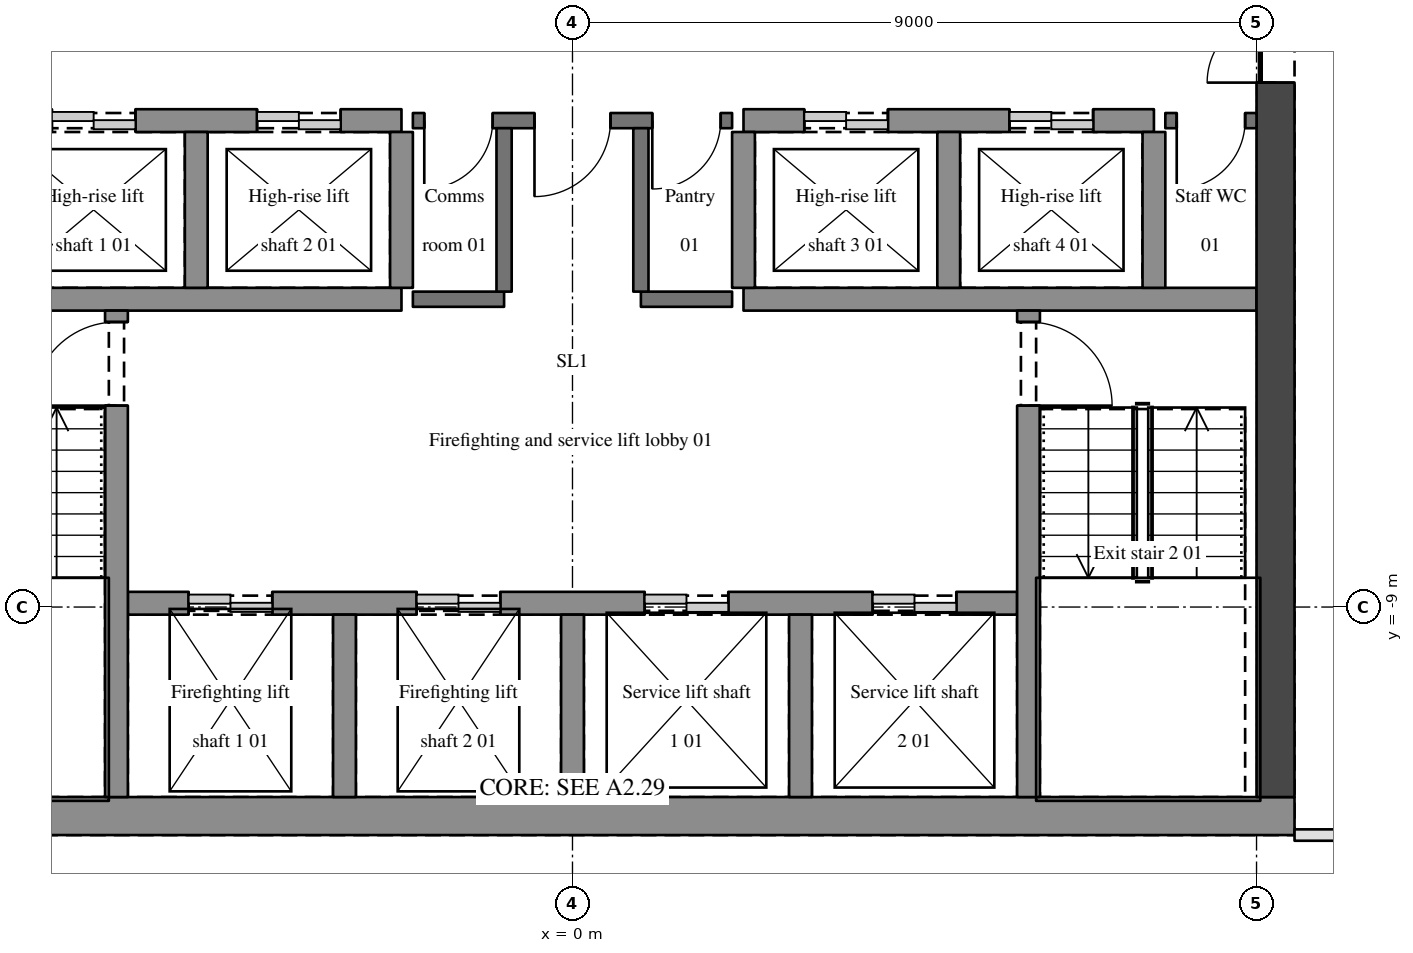
"""IFC4 building model, lengths in metres.
Left out: names, types, materials, properties, quantities, classifications, styles, units other than length and angle.
Written with IfcOpenShell. Run it as: python <this file> out.ifc"""

import sys

from ifc_helpers import new_model, si_unit, direction, frame, frame_2d, origin, place, context, subcontext, project, spatial, rectangle, extrude, element, fill, save


model = new_model("IFC4")
c1 = context("Model", 3, precision=1e-05, world=origin(), true_north=direction((0.0, 1.0)))
c2 = subcontext(c1, "Body", "Model", "MODEL_VIEW")
j1 = project(units=[si_unit("LENGTHUNIT", "METRE"), si_unit("PLANEANGLEUNIT", "RADIAN")], contexts=[c1])
p1 = place(None, origin())
s1 = spatial("IfcSite", under=j1, at=p1, CompositionType="ELEMENT")
p2 = place(p1, origin())
s2 = spatial("IfcBuilding", under=s1, at=p2, CompositionType="ELEMENT")
p3 = place(p2, frame((0.0, 0.0, 206.85)))
s3 = spatial("IfcBuildingStorey", under=s2, at=p3, CompositionType="ELEMENT", Elevation=206.85)
p4 = place(p3, frame((-9.5, -11.75, 0.0), z_axis=(0.0, 0.0, 1.0), x_axis=(1.0, 0.0, 0.0)))
e1 = element("IfcWall", 1, at=p4, inside=s3, PredefinedType="SHEAR", context=c2, shape_type="SweptSolid", body=[
    extrude(rectangle(XDim=19.0, YDim=0.5, at=frame_2d((9.5, 0.0))), origin(), (0.0, 0.0, 1.0), 3.15),
])
p5 = place(p3, frame((9.25, -11.5, 0.0), z_axis=(0.0, 0.0, 1.0), x_axis=(0.0, 1.0, 0.0)))
e2 = element("IfcWall", 2, at=p5, inside=s3, PredefinedType="SHEAR", context=c2, shape_type="SweptSolid", body=[
    extrude(rectangle(XDim=11.65, YDim=0.5, at=frame_2d((5.825, 0.0))), origin(), (0.0, 0.0, 1.0), 3.15),
])
p6 = place(p5, frame((9.4, 0.0, 0.0)))
e3 = element("IfcOpeningElement", 3, at=p6, cuts=e2, PredefinedType="OPENING", context=c2, shape_type="SweptSolid", body=[
    extrude(rectangle(XDim=1.8, YDim=2.1, at=frame_2d((0.9, 1.05))), frame((0.0, 0.26, 0.0), z_axis=(0.0, -1.0, 0.0), x_axis=(1.0, 0.0, 0.0)), (0.0, 0.0, 1.0), 0.52),
])
p7 = place(p3, frame((9.5, -12.0, 0.0), z_axis=(0.0, 0.0, 1.0), x_axis=(1.0, 0.0, 0.0)))
e4 = element("IfcWall", 4, at=p7, inside=s3, PredefinedType="PARTITIONING", context=c2, shape_type="SweptSolid", body=[
    extrude(rectangle(XDim=1.8, YDim=0.15, at=frame_2d((0.9, 0.0))), origin(), (0.0, 0.0, 1.0), 2.21),
])
p8 = place(p3, frame((-5.85, -8.95, 0.0), z_axis=(0.0, 0.0, 1.0), x_axis=(1.0, 0.0, 0.0)))
e5 = element("IfcWall", 5, at=p8, inside=s3, PredefinedType="SHEAR", context=c2, shape_type="SweptSolid", body=[
    extrude(rectangle(XDim=11.7, YDim=0.3, at=frame_2d((5.85, 0.0))), origin(), (0.0, 0.0, 1.0), 3.15),
])
p9 = place(p8, frame((0.8, 0.0, 0.0)))
e6 = element("IfcOpeningElement", 6, at=p9, cuts=e5, PredefinedType="OPENING", context=c2, shape_type="SweptSolid", body=[
    extrude(rectangle(XDim=1.1, YDim=2.1, at=frame_2d((0.55, 1.05))), frame((0.0, 0.16, 0.0), z_axis=(0.0, -1.0, 0.0), x_axis=(1.0, 0.0, 0.0)), (0.0, 0.0, 1.0), 0.32),
])
p10 = place(p8, frame((3.8, 0.0, 0.0)))
e7 = element("IfcOpeningElement", 7, at=p10, cuts=e5, PredefinedType="OPENING", context=c2, shape_type="SweptSolid", body=[
    extrude(rectangle(XDim=1.1, YDim=2.1, at=frame_2d((0.55, 1.05))), frame((0.0, 0.16, 0.0), z_axis=(0.0, -1.0, 0.0), x_axis=(1.0, 0.0, 0.0)), (0.0, 0.0, 1.0), 0.32),
])
p11 = place(p8, frame((6.8, 0.0, 0.0)))
e8 = element("IfcOpeningElement", 8, at=p11, cuts=e5, PredefinedType="OPENING", context=c2, shape_type="SweptSolid", body=[
    extrude(rectangle(XDim=1.1, YDim=2.1, at=frame_2d((0.55, 1.05))), frame((0.0, 0.16, 0.0), z_axis=(0.0, -1.0, 0.0), x_axis=(1.0, 0.0, 0.0)), (0.0, 0.0, 1.0), 0.32),
])
p12 = place(p8, frame((9.8, 0.0, 0.0)))
e9 = element("IfcOpeningElement", 9, at=p12, cuts=e5, PredefinedType="OPENING", context=c2, shape_type="SweptSolid", body=[
    extrude(rectangle(XDim=1.1, YDim=2.1, at=frame_2d((0.55, 1.05))), frame((0.0, 0.16, 0.0), z_axis=(0.0, -1.0, 0.0), x_axis=(1.0, 0.0, 0.0)), (0.0, 0.0, 1.0), 0.32),
])
p13 = place(p3, frame((-9.0, -4.95, 0.0), z_axis=(0.0, 0.0, 1.0), x_axis=(1.0, 0.0, 0.0)))
e10 = element("IfcWall", 10, at=p13, inside=s3, PredefinedType="SHEAR", context=c2, shape_type="SweptSolid", body=[
    extrude(rectangle(XDim=6.75, YDim=0.3, at=frame_2d((3.375, 0.0))), origin(), (0.0, 0.0, 1.0), 3.15),
])
for number, where, z_axis, x_axis in (
    (11, (-2.1, -4.95, 0.0), (0.0, 0.0, 1.0), (1.0, 0.0, 0.0)),
    (12, (0.9, -4.95, 0.0), (0.0, 0.0, 1.0), (1.0, 0.0, 0.0)),
):
    element("IfcWall", number, at=place(p3, frame(where, z_axis=z_axis, x_axis=x_axis)), inside=s3, PredefinedType="SOLIDWALL", context=c2, shape_type="SweptSolid", body=[
        extrude(rectangle(XDim=1.2, YDim=0.2, at=frame_2d((0.6, 0.0))), origin(), (0.0, 0.0, 1.0), 2.85),
    ])
p14 = place(p3, frame((2.25, -4.95, 0.0), z_axis=(0.0, 0.0, 1.0), x_axis=(1.0, 0.0, 0.0)))
e13 = element("IfcWall", 13, at=p14, inside=s3, PredefinedType="SHEAR", context=c2, shape_type="SweptSolid", body=[
    extrude(rectangle(XDim=6.75, YDim=0.3, at=frame_2d((3.375, 0.0))), origin(), (0.0, 0.0, 1.0), 3.15),
])
p15 = place(p3, frame((-7.65, -2.6, 0.0), z_axis=(0.0, 0.0, 1.0), x_axis=(1.0, 0.0, 0.0)))
e14 = element("IfcWall", 14, at=p15, inside=s3, PredefinedType="SHEAR", context=c2, shape_type="SweptSolid", body=[
    extrude(rectangle(XDim=5.4, YDim=0.3, at=frame_2d((2.7, 0.0))), origin(), (0.0, 0.0, 1.0), 3.15),
])
p16 = place(p15, frame((0.8, 0.0, 0.0)))
e15 = element("IfcOpeningElement", 15, at=p16, cuts=e14, PredefinedType="OPENING", context=c2, shape_type="SweptSolid", body=[
    extrude(rectangle(XDim=1.1, YDim=2.1, at=frame_2d((0.55, 1.05))), frame((0.0, 0.16, 0.0), z_axis=(0.0, -1.0, 0.0), x_axis=(1.0, 0.0, 0.0)), (0.0, 0.0, 1.0), 0.32),
])
p17 = place(p15, frame((3.5, 0.0, 0.0)))
e16 = element("IfcOpeningElement", 16, at=p17, cuts=e14, PredefinedType="OPENING", context=c2, shape_type="SweptSolid", body=[
    extrude(rectangle(XDim=1.1, YDim=2.1, at=frame_2d((0.55, 1.05))), frame((0.0, 0.16, 0.0), z_axis=(0.0, -1.0, 0.0), x_axis=(1.0, 0.0, 0.0)), (0.0, 0.0, 1.0), 0.32),
])
p18 = place(p3, frame((2.1, -2.6, 0.0), z_axis=(0.0, 0.0, 1.0), x_axis=(-1.0, 0.0, 0.0)))
e17 = element("IfcWall", 17, at=p18, inside=s3, PredefinedType="SOLIDWALL", context=c2, shape_type="SweptSolid", body=[
    extrude(rectangle(XDim=4.2, YDim=0.2, at=frame_2d((2.1, 0.0))), origin(), (0.0, 0.0, 1.0), 2.85),
])
p19 = place(p18, frame((1.6, 0.0, 0.0)))
e18 = element("IfcOpeningElement", 18, at=p19, cuts=e17, PredefinedType="OPENING", context=c2, shape_type="SweptSolid", body=[
    extrude(rectangle(XDim=1.0, YDim=2.1, at=frame_2d((0.5, 1.05))), frame((0.0, 0.11, 0.0), z_axis=(0.0, -1.0, 0.0), x_axis=(1.0, 0.0, 0.0)), (0.0, 0.0, 1.0), 0.22),
])
p20 = place(p18, frame((3.15, 0.0, 0.0)))
e19 = element("IfcOpeningElement", 19, at=p20, cuts=e17, PredefinedType="OPENING", context=c2, shape_type="SweptSolid", body=[
    extrude(rectangle(XDim=0.9, YDim=2.1, at=frame_2d((0.45, 1.05))), frame((0.0, 0.11, 0.0), z_axis=(0.0, -1.0, 0.0), x_axis=(1.0, 0.0, 0.0)), (0.0, 0.0, 1.0), 0.22),
])
p21 = place(p18, frame((0.15, 0.0, 0.0)))
e20 = element("IfcOpeningElement", 20, at=p21, cuts=e17, PredefinedType="OPENING", context=c2, shape_type="SweptSolid", body=[
    extrude(rectangle(XDim=0.9, YDim=2.1, at=frame_2d((0.45, 1.05))), frame((0.0, 0.11, 0.0), z_axis=(0.0, -1.0, 0.0), x_axis=(1.0, 0.0, 0.0)), (0.0, 0.0, 1.0), 0.22),
])
p22 = place(p3, frame((2.25, -2.6, 0.0), z_axis=(0.0, 0.0, 1.0), x_axis=(1.0, 0.0, 0.0)))
e21 = element("IfcWall", 21, at=p22, inside=s3, PredefinedType="SHEAR", context=c2, shape_type="SweptSolid", body=[
    extrude(rectangle(XDim=5.4, YDim=0.3, at=frame_2d((2.7, 0.0))), origin(), (0.0, 0.0, 1.0), 3.15),
])
p23 = place(p22, frame((0.8, 0.0, 0.0)))
e22 = element("IfcOpeningElement", 22, at=p23, cuts=e21, PredefinedType="OPENING", context=c2, shape_type="SweptSolid", body=[
    extrude(rectangle(XDim=1.1, YDim=2.1, at=frame_2d((0.55, 1.05))), frame((0.0, 0.16, 0.0), z_axis=(0.0, -1.0, 0.0), x_axis=(1.0, 0.0, 0.0)), (0.0, 0.0, 1.0), 0.32),
])
p24 = place(p22, frame((3.5, 0.0, 0.0)))
e23 = element("IfcOpeningElement", 23, at=p24, cuts=e21, PredefinedType="OPENING", context=c2, shape_type="SweptSolid", body=[
    extrude(rectangle(XDim=1.1, YDim=2.1, at=frame_2d((0.55, 1.05))), frame((0.0, 0.16, 0.0), z_axis=(0.0, -1.0, 0.0), x_axis=(1.0, 0.0, 0.0)), (0.0, 0.0, 1.0), 0.32),
])
p25 = place(p3, frame((9.0, -2.6, 0.0), z_axis=(0.0, 0.0, 1.0), x_axis=(-1.0, 0.0, 0.0)))
e24 = element("IfcWall", 24, at=p25, inside=s3, PredefinedType="SOLIDWALL", context=c2, shape_type="SweptSolid", body=[
    extrude(rectangle(XDim=1.2, YDim=0.2, at=frame_2d((0.6, 0.0))), origin(), (0.0, 0.0, 1.0), 2.85),
])
p26 = place(p25, frame((0.15, 0.0, 0.0)))
e25 = element("IfcOpeningElement", 25, at=p26, cuts=e24, PredefinedType="OPENING", context=c2, shape_type="SweptSolid", body=[
    extrude(rectangle(XDim=0.9, YDim=2.1, at=frame_2d((0.45, 1.05))), frame((0.0, 0.11, 0.0), z_axis=(0.0, -1.0, 0.0), x_axis=(1.0, 0.0, 0.0)), (0.0, 0.0, 1.0), 0.22),
])
p27 = place(p3, frame((-6.0, -11.5, 0.0), z_axis=(0.0, 0.0, 1.0), x_axis=(0.0, 1.0, 0.0)))
e26 = element("IfcWall", 26, at=p27, inside=s3, PredefinedType="SHEAR", context=c2, shape_type="SweptSolid", body=[
    extrude(rectangle(XDim=6.4, YDim=0.3, at=frame_2d((3.2, 0.0))), origin(), (0.0, 0.0, 1.0), 3.15),
])
p28 = place(p27, frame((5.15, 0.0, 0.0)))
e27 = element("IfcOpeningElement", 27, at=p28, cuts=e26, PredefinedType="OPENING", context=c2, shape_type="SweptSolid", body=[
    extrude(rectangle(XDim=1.1, YDim=2.1, at=frame_2d((0.55, 1.05))), frame((0.0, 0.16, 0.0), z_axis=(0.0, -1.0, 0.0), x_axis=(1.0, 0.0, 0.0)), (0.0, 0.0, 1.0), 0.32),
])
p29 = place(p3, frame((-4.95, -4.8, 0.0), z_axis=(0.0, 0.0, 1.0), x_axis=(0.0, 1.0, 0.0)))
e28 = element("IfcWall", 28, at=p29, inside=s3, PredefinedType="SHEAR", context=c2, shape_type="SweptSolid", body=[
    extrude(rectangle(XDim=2.05, YDim=0.3, at=frame_2d((1.025, 0.0))), origin(), (0.0, 0.0, 1.0), 3.15),
])
p30 = place(p3, frame((-3.0, -11.5, 0.0), z_axis=(0.0, 0.0, 1.0), x_axis=(0.0, 1.0, 0.0)))
e29 = element("IfcWall", 29, at=p30, inside=s3, PredefinedType="SHEAR", context=c2, shape_type="SweptSolid", body=[
    extrude(rectangle(XDim=2.4, YDim=0.3, at=frame_2d((1.2, 0.0))), origin(), (0.0, 0.0, 1.0), 3.15),
])
p31 = place(p3, frame((-2.25, -4.8, 0.0), z_axis=(0.0, 0.0, 1.0), x_axis=(0.0, 1.0, 0.0)))
e30 = element("IfcWall", 30, at=p31, inside=s3, PredefinedType="SHEAR", context=c2, shape_type="SweptSolid", body=[
    extrude(rectangle(XDim=2.05, YDim=0.3, at=frame_2d((1.025, 0.0))), origin(), (0.0, 0.0, 1.0), 3.15),
])
p32 = place(p3, frame((-0.9, -4.85, 0.0), z_axis=(0.0, 0.0, 1.0), x_axis=(0.0, 1.0, 0.0)))
e31 = element("IfcWall", 31, at=p32, inside=s3, PredefinedType="SOLIDWALL", context=c2, shape_type="SweptSolid", body=[
    extrude(rectangle(XDim=2.15, YDim=0.2, at=frame_2d((1.075, 0.0))), origin(), (0.0, 0.0, 1.0), 2.85),
])
p33 = place(p3, frame((0.0, -11.5, 0.0), z_axis=(0.0, 0.0, 1.0), x_axis=(0.0, 1.0, 0.0)))
e32 = element("IfcWall", 32, at=p33, inside=s3, PredefinedType="SHEAR", context=c2, shape_type="SweptSolid", body=[
    extrude(rectangle(XDim=2.4, YDim=0.3, at=frame_2d((1.2, 0.0))), origin(), (0.0, 0.0, 1.0), 3.15),
])
p34 = place(p3, frame((0.9, -4.85, 0.0), z_axis=(0.0, 0.0, 1.0), x_axis=(0.0, 1.0, 0.0)))
e33 = element("IfcWall", 33, at=p34, inside=s3, PredefinedType="SOLIDWALL", context=c2, shape_type="SweptSolid", body=[
    extrude(rectangle(XDim=2.15, YDim=0.2, at=frame_2d((1.075, 0.0))), origin(), (0.0, 0.0, 1.0), 2.85),
])
p35 = place(p3, frame((2.25, -4.8, 0.0), z_axis=(0.0, 0.0, 1.0), x_axis=(0.0, 1.0, 0.0)))
e34 = element("IfcWall", 34, at=p35, inside=s3, PredefinedType="SHEAR", context=c2, shape_type="SweptSolid", body=[
    extrude(rectangle(XDim=2.05, YDim=0.3, at=frame_2d((1.025, 0.0))), origin(), (0.0, 0.0, 1.0), 3.15),
])
p36 = place(p3, frame((3.0, -11.5, 0.0), z_axis=(0.0, 0.0, 1.0), x_axis=(0.0, 1.0, 0.0)))
e35 = element("IfcWall", 35, at=p36, inside=s3, PredefinedType="SHEAR", context=c2, shape_type="SweptSolid", body=[
    extrude(rectangle(XDim=2.4, YDim=0.3, at=frame_2d((1.2, 0.0))), origin(), (0.0, 0.0, 1.0), 3.15),
])
p37 = place(p3, frame((4.95, -4.8, 0.0), z_axis=(0.0, 0.0, 1.0), x_axis=(0.0, 1.0, 0.0)))
e36 = element("IfcWall", 36, at=p37, inside=s3, PredefinedType="SHEAR", context=c2, shape_type="SweptSolid", body=[
    extrude(rectangle(XDim=2.05, YDim=0.3, at=frame_2d((1.025, 0.0))), origin(), (0.0, 0.0, 1.0), 3.15),
])
p38 = place(p3, frame((6.0, -5.1, 0.0), z_axis=(0.0, 0.0, 1.0), x_axis=(0.0, -1.0, 0.0)))
e37 = element("IfcWall", 37, at=p38, inside=s3, PredefinedType="SHEAR", context=c2, shape_type="SweptSolid", body=[
    extrude(rectangle(XDim=6.4, YDim=0.3, at=frame_2d((3.2, 0.0))), origin(), (0.0, 0.0, 1.0), 3.15),
])
p39 = place(p38, frame((0.15, 0.0, 0.0)))
e38 = element("IfcOpeningElement", 38, at=p39, cuts=e37, PredefinedType="OPENING", context=c2, shape_type="SweptSolid", body=[
    extrude(rectangle(XDim=1.1, YDim=2.1, at=frame_2d((0.55, 1.05))), frame((0.0, 0.16, 0.0), z_axis=(0.0, -1.0, 0.0), x_axis=(1.0, 0.0, 0.0)), (0.0, 0.0, 1.0), 0.32),
])
p40 = place(p3, frame((7.65, -4.8, 0.0), z_axis=(0.0, 0.0, 1.0), x_axis=(0.0, 1.0, 0.0)))
e39 = element("IfcWall", 39, at=p40, inside=s3, PredefinedType="SHEAR", context=c2, shape_type="SweptSolid", body=[
    extrude(rectangle(XDim=2.05, YDim=0.3, at=frame_2d((1.025, 0.0))), origin(), (0.0, 0.0, 1.0), 3.15),
])
p41 = place(p6, origin())
e40 = element("IfcDoor", 40, at=p41, inside=s3, OperationType="DOUBLE_DOOR_SINGLE_SWING", PredefinedType="DOOR", context=c2, shape_type="SweptSolid", body=[
    extrude(rectangle(XDim=1.8, YDim=2.1, at=frame_2d((0.9, 1.05))), frame((0.0, 0.025, 0.0), z_axis=(0.0, -1.0, 0.0), x_axis=(1.0, 0.0, 0.0)), (0.0, 0.0, 1.0), 0.05),
])
fill(e3, e40)
p42 = place(p19, origin())
e41 = element("IfcDoor", 41, at=p42, inside=s3, OperationType="SINGLE_SWING_RIGHT", PredefinedType="DOOR", context=c2, shape_type="SweptSolid", body=[
    extrude(rectangle(XDim=1.0, YDim=2.1, at=frame_2d((0.5, 1.05))), frame((0.0, 0.025, 0.0), z_axis=(0.0, -1.0, 0.0), x_axis=(1.0, 0.0, 0.0)), (0.0, 0.0, 1.0), 0.05),
])
fill(e18, e41)
p43 = place(p28, origin())
e42 = element("IfcDoor", 42, at=p43, inside=s3, OperationType="SINGLE_SWING_LEFT", PredefinedType="DOOR", context=c2, shape_type="SweptSolid", body=[
    extrude(rectangle(XDim=1.1, YDim=2.1, at=frame_2d((0.55, 1.05))), frame((0.0, 0.025, 0.0), z_axis=(0.0, -1.0, 0.0), x_axis=(1.0, 0.0, 0.0)), (0.0, 0.0, 1.0), 0.05),
])
fill(e27, e42)
p44 = place(p39, origin())
e43 = element("IfcDoor", 43, at=p44, inside=s3, OperationType="SINGLE_SWING_RIGHT", PredefinedType="DOOR", context=c2, shape_type="SweptSolid", body=[
    extrude(rectangle(XDim=1.1, YDim=2.1, at=frame_2d((0.55, 1.05))), frame((0.0, 0.025, 0.0), z_axis=(0.0, -1.0, 0.0), x_axis=(1.0, 0.0, 0.0)), (0.0, 0.0, 1.0), 0.05),
])
fill(e38, e43)
p45 = place(p20, origin())
e44 = element("IfcDoor", 44, at=p45, inside=s3, OperationType="SINGLE_SWING_RIGHT", PredefinedType="DOOR", context=c2, shape_type="SweptSolid", body=[
    extrude(rectangle(XDim=0.9, YDim=2.1, at=frame_2d((0.45, 1.05))), frame((0.0, 0.025, 0.0), z_axis=(0.0, -1.0, 0.0), x_axis=(1.0, 0.0, 0.0)), (0.0, 0.0, 1.0), 0.05),
])
fill(e19, e44)
p46 = place(p21, origin())
e45 = element("IfcDoor", 45, at=p46, inside=s3, OperationType="SINGLE_SWING_RIGHT", PredefinedType="DOOR", context=c2, shape_type="SweptSolid", body=[
    extrude(rectangle(XDim=0.9, YDim=2.1, at=frame_2d((0.45, 1.05))), frame((0.0, 0.025, 0.0), z_axis=(0.0, -1.0, 0.0), x_axis=(1.0, 0.0, 0.0)), (0.0, 0.0, 1.0), 0.05),
])
fill(e20, e45)
p47 = place(p26, origin())
e46 = element("IfcDoor", 46, at=p47, inside=s3, OperationType="SINGLE_SWING_RIGHT", PredefinedType="DOOR", context=c2, shape_type="SweptSolid", body=[
    extrude(rectangle(XDim=0.9, YDim=2.1, at=frame_2d((0.45, 1.05))), frame((0.0, 0.025, 0.0), z_axis=(0.0, -1.0, 0.0), x_axis=(1.0, 0.0, 0.0)), (0.0, 0.0, 1.0), 0.05),
])
fill(e25, e46)
p48 = place(p9, origin())
e47 = element("IfcDoor", 47, at=p48, inside=s3, OperationType="DOUBLE_DOOR_SLIDING", PredefinedType="DOOR", context=c2, shape_type="SweptSolid", body=[
    extrude(rectangle(XDim=1.1, YDim=2.1, at=frame_2d((0.55, 1.05))), frame((0.0, 0.025, 0.0), z_axis=(0.0, -1.0, 0.0), x_axis=(1.0, 0.0, 0.0)), (0.0, 0.0, 1.0), 0.05),
])
fill(e6, e47)
p49 = place(p10, origin())
e48 = element("IfcDoor", 48, at=p49, inside=s3, OperationType="DOUBLE_DOOR_SLIDING", PredefinedType="DOOR", context=c2, shape_type="SweptSolid", body=[
    extrude(rectangle(XDim=1.1, YDim=2.1, at=frame_2d((0.55, 1.05))), frame((0.0, 0.025, 0.0), z_axis=(0.0, -1.0, 0.0), x_axis=(1.0, 0.0, 0.0)), (0.0, 0.0, 1.0), 0.05),
])
fill(e7, e48)
p50 = place(p16, origin())
e49 = element("IfcDoor", 49, at=p50, inside=s3, OperationType="DOUBLE_DOOR_SLIDING", PredefinedType="DOOR", context=c2, shape_type="SweptSolid", body=[
    extrude(rectangle(XDim=1.1, YDim=2.1, at=frame_2d((0.55, 1.05))), frame((0.0, 0.025, 0.0), z_axis=(0.0, -1.0, 0.0), x_axis=(1.0, 0.0, 0.0)), (0.0, 0.0, 1.0), 0.05),
])
fill(e15, e49)
p51 = place(p17, origin())
e50 = element("IfcDoor", 50, at=p51, inside=s3, OperationType="DOUBLE_DOOR_SLIDING", PredefinedType="DOOR", context=c2, shape_type="SweptSolid", body=[
    extrude(rectangle(XDim=1.1, YDim=2.1, at=frame_2d((0.55, 1.05))), frame((0.0, 0.025, 0.0), z_axis=(0.0, -1.0, 0.0), x_axis=(1.0, 0.0, 0.0)), (0.0, 0.0, 1.0), 0.05),
])
fill(e16, e50)
p52 = place(p23, origin())
e51 = element("IfcDoor", 51, at=p52, inside=s3, OperationType="DOUBLE_DOOR_SLIDING", PredefinedType="DOOR", context=c2, shape_type="SweptSolid", body=[
    extrude(rectangle(XDim=1.1, YDim=2.1, at=frame_2d((0.55, 1.05))), frame((0.0, 0.025, 0.0), z_axis=(0.0, -1.0, 0.0), x_axis=(1.0, 0.0, 0.0)), (0.0, 0.0, 1.0), 0.05),
])
fill(e22, e51)
p53 = place(p24, origin())
e52 = element("IfcDoor", 52, at=p53, inside=s3, OperationType="DOUBLE_DOOR_SLIDING", PredefinedType="DOOR", context=c2, shape_type="SweptSolid", body=[
    extrude(rectangle(XDim=1.1, YDim=2.1, at=frame_2d((0.55, 1.05))), frame((0.0, 0.025, 0.0), z_axis=(0.0, -1.0, 0.0), x_axis=(1.0, 0.0, 0.0)), (0.0, 0.0, 1.0), 0.05),
])
fill(e23, e52)
p54 = place(p11, origin())
e53 = element("IfcDoor", 53, at=p54, inside=s3, OperationType="DOUBLE_DOOR_SLIDING", PredefinedType="DOOR", context=c2, shape_type="SweptSolid", body=[
    extrude(rectangle(XDim=1.1, YDim=2.1, at=frame_2d((0.55, 1.05))), frame((0.0, 0.025, 0.0), z_axis=(0.0, -1.0, 0.0), x_axis=(1.0, 0.0, 0.0)), (0.0, 0.0, 1.0), 0.05),
])
fill(e8, e53)
p55 = place(p12, origin())
e54 = element("IfcDoor", 54, at=p55, inside=s3, OperationType="DOUBLE_DOOR_SLIDING", PredefinedType="DOOR", context=c2, shape_type="SweptSolid", body=[
    extrude(rectangle(XDim=1.1, YDim=2.1, at=frame_2d((0.55, 1.05))), frame((0.0, 0.025, 0.0), z_axis=(0.0, -1.0, 0.0), x_axis=(1.0, 0.0, 0.0)), (0.0, 0.0, 1.0), 0.05),
])
fill(e9, e54)
save(model, sys.argv[1])
